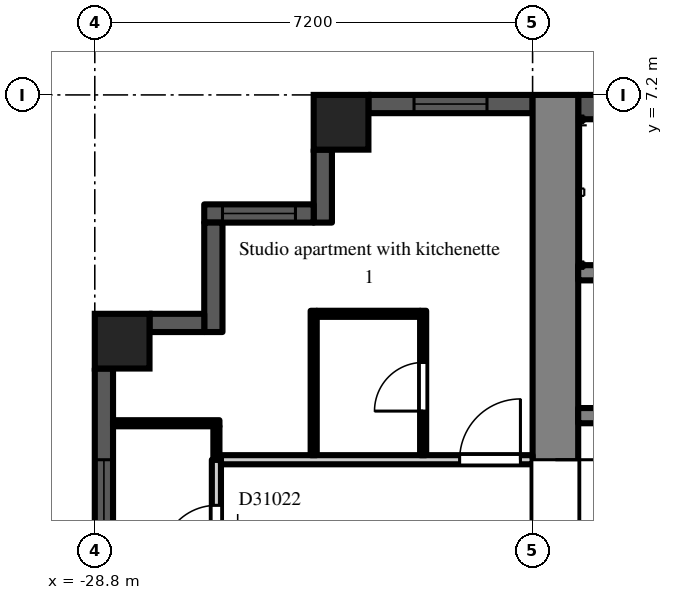
"""IFC4 building model, lengths in metres.
Left out: names, types, materials, properties, quantities, classifications, styles, units other than length and angle.
Written with IfcOpenShell. Run it as: python <this file> out.ifc"""

import sys

from ifc_helpers import new_model, si_unit, direction, frame, frame_2d, origin, origin_2d, place, context, subcontext, project, spatial, rectangle, extrude, element, fill, save


model = new_model("IFC4")
c1 = context("Model", 3, precision=1e-05, world=origin(), true_north=direction((0.0, 1.0)))
c2 = subcontext(c1, "Body", "Model", "MODEL_VIEW")
j1 = project(units=[si_unit("LENGTHUNIT", "METRE"), si_unit("PLANEANGLEUNIT", "RADIAN")], contexts=[c1])
p1 = place(None, origin())
s1 = spatial("IfcSite", under=j1, at=p1, CompositionType="ELEMENT")
p2 = place(p1, origin())
s2 = spatial("IfcBuilding", under=s1, at=p2, CompositionType="ELEMENT")
p3 = place(p2, frame((0.0, 0.0, 216.9)))
s3 = spatial("IfcBuildingStorey", under=s2, at=p3, CompositionType="ELEMENT", Elevation=216.9)
for number, where, z_axis, x_axis in (
    (1, (-28.35, 3.15, 0.0), (0.0, 0.0, 1.0), (1.0, 0.0, 0.0)),
    (2, (-24.75, 6.75, 0.0), (0.0, 0.0, 1.0), (1.0, 0.0, 0.0)),
):
    element("IfcColumn", number, at=place(p3, frame(where, z_axis=z_axis, x_axis=x_axis)), inside=s3, PredefinedType="COLUMN", context=c2, shape_type="SweptSolid", body=[
        extrude(rectangle(XDim=0.9, YDim=0.9, at=origin_2d()), origin(), (0.0, 0.0, 1.0), 3.0),
    ])
p4 = place(p3, frame((-21.6, 7.05, 0.0), z_axis=(0.0, 0.0, 1.0), x_axis=(-1.0, 0.0, 0.0)))
e3 = element("IfcWall", 3, at=p4, inside=s3, PredefinedType="SOLIDWALL", context=c2, shape_type="SweptSolid", body=[
    extrude(rectangle(XDim=2.7, YDim=0.3, at=frame_2d((1.35, 0.0))), origin(), (0.0, 0.0, 1.0), 2.3),
])
p5 = place(p4, frame((0.75, 0.0, 0.2)))
e4 = element("IfcOpeningElement", 4, at=p5, cuts=e3, PredefinedType="OPENING", context=c2, shape_type="SweptSolid", body=[
    extrude(rectangle(XDim=1.2, YDim=1.85, at=frame_2d((0.6, 0.925))), frame((0.0, 0.16, 0.0), z_axis=(0.0, -1.0, 0.0), x_axis=(1.0, 0.0, 0.0)), (0.0, 0.0, 1.0), 0.32),
])
p6 = place(p3, frame((-25.05, 6.3, 0.0), z_axis=(0.0, 0.0, 1.0), x_axis=(0.0, -1.0, 0.0)))
e5 = element("IfcWall", 5, at=p6, inside=s3, PredefinedType="SOLIDWALL", context=c2, shape_type="SweptSolid", body=[
    extrude(rectangle(XDim=1.2, YDim=0.3, at=frame_2d((0.6, 0.0))), origin(), (0.0, 0.0, 1.0), 2.6),
])
p7 = place(p3, frame((-25.2, 5.25, 0.0), z_axis=(0.0, 0.0, 1.0), x_axis=(-1.0, 0.0, 0.0)))
e6 = element("IfcWall", 6, at=p7, inside=s3, PredefinedType="SOLIDWALL", context=c2, shape_type="SweptSolid", body=[
    extrude(rectangle(XDim=1.8, YDim=0.3, at=frame_2d((0.9, 0.0))), origin(), (0.0, 0.0, 1.0), 2.6),
])
p8 = place(p7, frame((0.3, 0.0, 0.2)))
e7 = element("IfcOpeningElement", 7, at=p8, cuts=e6, PredefinedType="OPENING", context=c2, shape_type="SweptSolid", body=[
    extrude(rectangle(XDim=1.2, YDim=1.85, at=frame_2d((0.6, 0.925))), frame((0.0, 0.16, 0.0), z_axis=(0.0, -1.0, 0.0), x_axis=(1.0, 0.0, 0.0)), (0.0, 0.0, 1.0), 0.32),
])
p9 = place(p3, frame((-26.85, 5.1, 0.0), z_axis=(0.0, 0.0, 1.0), x_axis=(0.0, -1.0, 0.0)))
e8 = element("IfcWall", 8, at=p9, inside=s3, PredefinedType="SOLIDWALL", context=c2, shape_type="SweptSolid", body=[
    extrude(rectangle(XDim=1.8, YDim=0.3, at=frame_2d((0.9, 0.0))), origin(), (0.0, 0.0, 1.0), 2.6),
])
p10 = place(p3, frame((-27.0, 3.45, 0.0), z_axis=(0.0, 0.0, 1.0), x_axis=(-1.0, 0.0, 0.0)))
e9 = element("IfcWall", 9, at=p10, inside=s3, PredefinedType="SOLIDWALL", context=c2, shape_type="SweptSolid", body=[
    extrude(rectangle(XDim=0.9, YDim=0.3, at=frame_2d((0.45, 0.0))), origin(), (0.0, 0.0, 1.0), 2.6),
])
p11 = place(p3, frame((-28.65, 2.7, 0.0), z_axis=(0.0, 0.0, 1.0), x_axis=(0.0, -1.0, 0.0)))
e10 = element("IfcWall", 10, at=p11, inside=s3, PredefinedType="SOLIDWALL", context=c2, shape_type="SweptSolid", body=[
    extrude(rectangle(XDim=5.4, YDim=0.3, at=frame_2d((2.7, 0.0))), origin(), (0.0, 0.0, 1.0), 2.3),
])
p12 = place(p11, frame((1.5, 0.0, 0.2)))
e11 = element("IfcOpeningElement", 11, at=p12, cuts=e10, PredefinedType="OPENING", context=c2, shape_type="SweptSolid", body=[
    extrude(rectangle(XDim=2.4, YDim=1.85, at=frame_2d((1.2, 0.925))), frame((0.0, 0.16, 0.0), z_axis=(0.0, -1.0, 0.0), x_axis=(1.0, 0.0, 0.0)), (0.0, 0.0, 1.0), 0.32),
])
p13 = place(p3, frame((-21.225, -7.2, 0.0), z_axis=(0.0, 0.0, 1.0), x_axis=(0.0, 1.0, 0.0)))
e12 = element("IfcWall", 12, at=p13, inside=s3, PredefinedType="SHEAR", context=c2, shape_type="SweptSolid", body=[
    extrude(rectangle(XDim=14.4, YDim=0.75, at=frame_2d((7.2, 0.0))), origin(), (0.0, 0.0, 1.0), 2.6),
])
p14 = place(p13, frame((6.0, 0.0, 0.0)))
e13 = element("IfcOpeningElement", 13, at=p14, cuts=e12, PredefinedType="OPENING", context=c2, shape_type="SweptSolid", body=[
    extrude(rectangle(XDim=2.4, YDim=2.2, at=frame_2d((1.2, 1.1))), frame((0.0, 0.385, 0.0), z_axis=(0.0, -1.0, 0.0), x_axis=(1.0, 0.0, 0.0)), (0.0, 0.0, 1.0), 0.77),
])
p15 = place(p3, frame((-7.9, 7.0, 0.0), z_axis=(0.0, 0.0, 1.0), x_axis=(-1.0, 0.0, 0.0)))
e14 = element("IfcWall", 14, at=p15, inside=s3, PredefinedType="SHEAR", context=c2, shape_type="SweptSolid", body=[
    extrude(rectangle(XDim=12.95, YDim=0.4, at=frame_2d((6.475, 0.0))), origin(), (0.0, 0.0, 1.0), 2.6),
])
p16 = place(p3, frame((-7.9, 1.925, 0.0), z_axis=(0.0, 0.0, 1.0), x_axis=(-1.0, 0.0, 0.0)))
e15 = element("IfcWall", 15, at=p16, inside=s3, PredefinedType="SHEAR", context=c2, shape_type="SweptSolid", body=[
    extrude(rectangle(XDim=12.95, YDim=0.25, at=frame_2d((6.475, 0.0))), origin(), (0.0, 0.0, 1.0), 2.6),
])
p17 = place(p16, frame((4.825, 0.0, 0.0)))
e16 = element("IfcOpeningElement", 16, at=p17, cuts=e15, PredefinedType="OPENING", context=c2, shape_type="SweptSolid", body=[
    extrude(rectangle(XDim=1.1, YDim=2.1, at=frame_2d((0.55, 1.05))), frame((0.0, 0.135, 0.0), z_axis=(0.0, -1.0, 0.0), x_axis=(1.0, 0.0, 0.0)), (0.0, 0.0, 1.0), 0.27),
])
p18 = place(p16, frame((7.025, 0.0, 0.0)))
e17 = element("IfcOpeningElement", 17, at=p18, cuts=e15, PredefinedType="OPENING", context=c2, shape_type="SweptSolid", body=[
    extrude(rectangle(XDim=1.1, YDim=2.1, at=frame_2d((0.55, 1.05))), frame((0.0, 0.135, 0.0), z_axis=(0.0, -1.0, 0.0), x_axis=(1.0, 0.0, 0.0)), (0.0, 0.0, 1.0), 0.27),
])
p19 = place(p16, frame((9.225, 0.0, 0.0)))
e18 = element("IfcOpeningElement", 18, at=p19, cuts=e15, PredefinedType="OPENING", context=c2, shape_type="SweptSolid", body=[
    extrude(rectangle(XDim=1.1, YDim=2.1, at=frame_2d((0.55, 1.05))), frame((0.0, 0.135, 0.0), z_axis=(0.0, -1.0, 0.0), x_axis=(1.0, 0.0, 0.0)), (0.0, 0.0, 1.0), 0.27),
])
p20 = place(p16, frame((0.525, 0.0, 0.0)))
e19 = element("IfcOpeningElement", 19, at=p20, cuts=e15, PredefinedType="OPENING", context=c2, shape_type="SweptSolid", body=[
    extrude(rectangle(XDim=0.9, YDim=2.1, at=frame_2d((0.45, 1.05))), frame((0.0, 0.135, 0.0), z_axis=(0.0, -1.0, 0.0), x_axis=(1.0, 0.0, 0.0)), (0.0, 0.0, 1.0), 0.27),
])
p21 = place(p16, frame((2.625, 0.0, 0.0)))
e20 = element("IfcOpeningElement", 20, at=p21, cuts=e15, PredefinedType="OPENING", context=c2, shape_type="SweptSolid", body=[
    extrude(rectangle(XDim=1.1, YDim=2.1, at=frame_2d((0.55, 1.05))), frame((0.0, 0.135, 0.0), z_axis=(0.0, -1.0, 0.0), x_axis=(1.0, 0.0, 0.0)), (0.0, 0.0, 1.0), 0.27),
])
p22 = place(p16, frame((11.525, 0.0, 0.0)))
e21 = element("IfcOpeningElement", 21, at=p22, cuts=e15, PredefinedType="OPENING", context=c2, shape_type="SweptSolid", body=[
    extrude(rectangle(XDim=0.9, YDim=2.1, at=frame_2d((0.45, 1.05))), frame((0.0, 0.135, 0.0), z_axis=(0.0, -1.0, 0.0), x_axis=(1.0, 0.0, 0.0)), (0.0, 0.0, 1.0), 0.27),
])
p23 = place(p3, frame((-12.3, 4.275, 0.0), z_axis=(0.0, 0.0, 1.0), x_axis=(-1.0, 0.0, 0.0)))
e22 = element("IfcWall", 22, at=p23, inside=s3, PredefinedType="SHEAR", context=c2, shape_type="SweptSolid", body=[
    extrude(rectangle(XDim=8.55, YDim=0.25, at=frame_2d((4.275, 0.0))), origin(), (0.0, 0.0, 1.0), 2.6),
])
p24 = place(p3, frame((-28.5, 1.8, 0.0), z_axis=(0.0, 0.0, 1.0), x_axis=(1.0, 0.0, 0.0)))
e23 = element("IfcWall", 23, at=p24, inside=s3, PredefinedType="PARTITIONING", context=c2, shape_type="SweptSolid", body=[
    extrude(rectangle(XDim=1.75, YDim=0.1, at=frame_2d((0.875, 0.0))), origin(), (0.0, 0.0, 1.0), 2.6),
])
p25 = place(p3, frame((-26.8, -1.2, 0.0), z_axis=(0.0, 0.0, 1.0), x_axis=(0.0, 1.0, 0.0)))
e24 = element("IfcWall", 24, at=p25, inside=s3, PredefinedType="PARTITIONING", context=c2, shape_type="SweptSolid", body=[
    extrude(rectangle(XDim=2.4, YDim=0.15, at=frame_2d((1.2, 0.0))), origin(), (0.0, 0.0, 1.0), 2.6),
])
p26 = place(p25, frame((0.75, 0.0, 0.0)))
e25 = element("IfcOpeningElement", 25, at=p26, cuts=e24, PredefinedType="OPENING", context=c2, shape_type="SweptSolid", body=[
    extrude(rectangle(XDim=0.9, YDim=2.1, at=frame_2d((0.45, 1.05))), frame((0.0, 0.085, 0.0), z_axis=(0.0, -1.0, 0.0), x_axis=(1.0, 0.0, 0.0)), (0.0, 0.0, 1.0), 0.17),
])
p27 = place(p3, frame((-26.8, 1.2, 0.0), z_axis=(0.0, 0.0, 1.0), x_axis=(0.0, 1.0, 0.0)))
e26 = element("IfcWall", 26, at=p27, inside=s3, PredefinedType="PARTITIONING", context=c2, shape_type="SweptSolid", body=[
    extrude(rectangle(XDim=0.55, YDim=0.1, at=frame_2d((0.275, 0.0))), origin(), (0.0, 0.0, 1.0), 2.6),
])
p28 = place(p3, frame((-26.725, 1.2, 0.0), z_axis=(0.0, 0.0, 1.0), x_axis=(1.0, 0.0, 0.0)))
e27 = element("IfcWall", 27, at=p28, inside=s3, PredefinedType="PARTITIONING", context=c2, shape_type="SweptSolid", body=[
    extrude(rectangle(XDim=5.125, YDim=0.15, at=frame_2d((2.562, 0.0))), origin(), (0.0, 0.0, 1.0), 2.6),
])
p29 = place(p28, frame((3.925, 0.0, 0.0)))
e28 = element("IfcOpeningElement", 28, at=p29, cuts=e27, PredefinedType="OPENING", context=c2, shape_type="SweptSolid", body=[
    extrude(rectangle(XDim=1.0, YDim=2.1, at=frame_2d((0.5, 1.05))), frame((0.0, 0.085, 0.0), z_axis=(0.0, -1.0, 0.0), x_axis=(1.0, 0.0, 0.0)), (0.0, 0.0, 1.0), 0.17),
])
p30 = place(p3, frame((-25.2, 1.275, 0.0), z_axis=(0.0, 0.0, 1.0), x_axis=(0.0, 1.0, 0.0)))
e29 = element("IfcWall", 29, at=p30, inside=s3, PredefinedType="PARTITIONING", context=c2, shape_type="SweptSolid", body=[
    extrude(rectangle(XDim=2.375, YDim=0.1, at=frame_2d((1.188, 0.0))), origin(), (0.0, 0.0, 1.0), 2.6),
])
p31 = place(p3, frame((-25.15, 3.6, 0.0), z_axis=(0.0, 0.0, 1.0), x_axis=(1.0, 0.0, 0.0)))
e30 = element("IfcWall", 30, at=p31, inside=s3, PredefinedType="PARTITIONING", context=c2, shape_type="SweptSolid", body=[
    extrude(rectangle(XDim=1.7, YDim=0.1, at=frame_2d((0.85, 0.0))), origin(), (0.0, 0.0, 1.0), 2.6),
])
p32 = place(p3, frame((-23.4, 1.275, 0.0), z_axis=(0.0, 0.0, 1.0), x_axis=(0.0, 1.0, 0.0)))
e31 = element("IfcWall", 31, at=p32, inside=s3, PredefinedType="PARTITIONING", context=c2, shape_type="SweptSolid", body=[
    extrude(rectangle(XDim=2.375, YDim=0.1, at=frame_2d((1.188, 0.0))), origin(), (0.0, 0.0, 1.0), 2.6),
])
p33 = place(p32, frame((0.725, 0.0, 0.0)))
e32 = element("IfcOpeningElement", 32, at=p33, cuts=e31, PredefinedType="OPENING", context=c2, shape_type="SweptSolid", body=[
    extrude(rectangle(XDim=0.8, YDim=2.1, at=frame_2d((0.4, 1.05))), frame((0.0, 0.06, 0.0), z_axis=(0.0, -1.0, 0.0), x_axis=(1.0, 0.0, 0.0)), (0.0, 0.0, 1.0), 0.12),
])
p34 = place(p5, origin())
e33 = element("IfcWindow", 33, at=p34, inside=s3, PartitioningType="SINGLE_PANEL", PredefinedType="WINDOW", context=c2, shape_type="SweptSolid", body=[
    extrude(rectangle(XDim=1.2, YDim=1.85, at=frame_2d((0.6, 0.925))), frame((0.0, 0.03, 0.0), z_axis=(0.0, -1.0, 0.0), x_axis=(1.0, 0.0, 0.0)), (0.0, 0.0, 1.0), 0.06),
])
fill(e4, e33)
p35 = place(p8, origin())
e34 = element("IfcWindow", 34, at=p35, inside=s3, PartitioningType="SINGLE_PANEL", PredefinedType="WINDOW", context=c2, shape_type="SweptSolid", body=[
    extrude(rectangle(XDim=1.2, YDim=1.85, at=frame_2d((0.6, 0.925))), frame((0.0, 0.03, 0.0), z_axis=(0.0, -1.0, 0.0), x_axis=(1.0, 0.0, 0.0)), (0.0, 0.0, 1.0), 0.06),
])
fill(e7, e34)
p36 = place(p12, origin())
e35 = element("IfcWindow", 35, at=p36, inside=s3, PartitioningType="SINGLE_PANEL", PredefinedType="WINDOW", context=c2, shape_type="SweptSolid", body=[
    extrude(rectangle(XDim=2.4, YDim=1.85, at=frame_2d((1.2, 0.925))), frame((0.0, 0.03, 0.0), z_axis=(0.0, -1.0, 0.0), x_axis=(1.0, 0.0, 0.0)), (0.0, 0.0, 1.0), 0.06),
])
fill(e11, e35)
p37 = place(p14, frame((2.4, 0.0, 0.0), z_axis=(0.0, 0.0, 1.0), x_axis=(-1.0, 0.0, 0.0)))
e36 = element("IfcDoor", 36, at=p37, inside=s3, OperationType="DOUBLE_DOOR_DOUBLE_SWING", PredefinedType="DOOR", context=c2, shape_type="SweptSolid", body=[
    extrude(rectangle(XDim=2.4, YDim=2.2, at=frame_2d((1.2, 1.1))), frame((0.0, 0.025, 0.0), z_axis=(0.0, -1.0, 0.0), x_axis=(1.0, 0.0, 0.0)), (0.0, 0.0, 1.0), 0.05),
])
fill(e13, e36)
p38 = place(p26, origin())
e37 = element("IfcDoor", 37, at=p38, inside=s3, OperationType="SINGLE_SWING_LEFT", PredefinedType="DOOR", context=c2, shape_type="SweptSolid", body=[
    extrude(rectangle(XDim=0.9, YDim=2.1, at=frame_2d((0.45, 1.05))), frame((0.0, 0.025, 0.0), z_axis=(0.0, -1.0, 0.0), x_axis=(1.0, 0.0, 0.0)), (0.0, 0.0, 1.0), 0.05),
])
fill(e25, e37)
p39 = place(p33, origin())
e38 = element("IfcDoor", 38, at=p39, inside=s3, OperationType="SINGLE_SWING_LEFT", PredefinedType="DOOR", context=c2, shape_type="SweptSolid", body=[
    extrude(rectangle(XDim=0.8, YDim=2.1, at=frame_2d((0.4, 1.05))), frame((0.0, 0.025, 0.0), z_axis=(0.0, -1.0, 0.0), x_axis=(1.0, 0.0, 0.0)), (0.0, 0.0, 1.0), 0.05),
])
fill(e32, e38)
p40 = place(p29, origin())
e39 = element("IfcDoor", 39, at=p40, inside=s3, OperationType="SINGLE_SWING_RIGHT", PredefinedType="DOOR", context=c2, shape_type="SweptSolid", body=[
    extrude(rectangle(XDim=1.0, YDim=2.1, at=frame_2d((0.5, 1.05))), frame((0.0, 0.025, 0.0), z_axis=(0.0, -1.0, 0.0), x_axis=(1.0, 0.0, 0.0)), (0.0, 0.0, 1.0), 0.05),
])
fill(e28, e39)
save(model, sys.argv[1])
